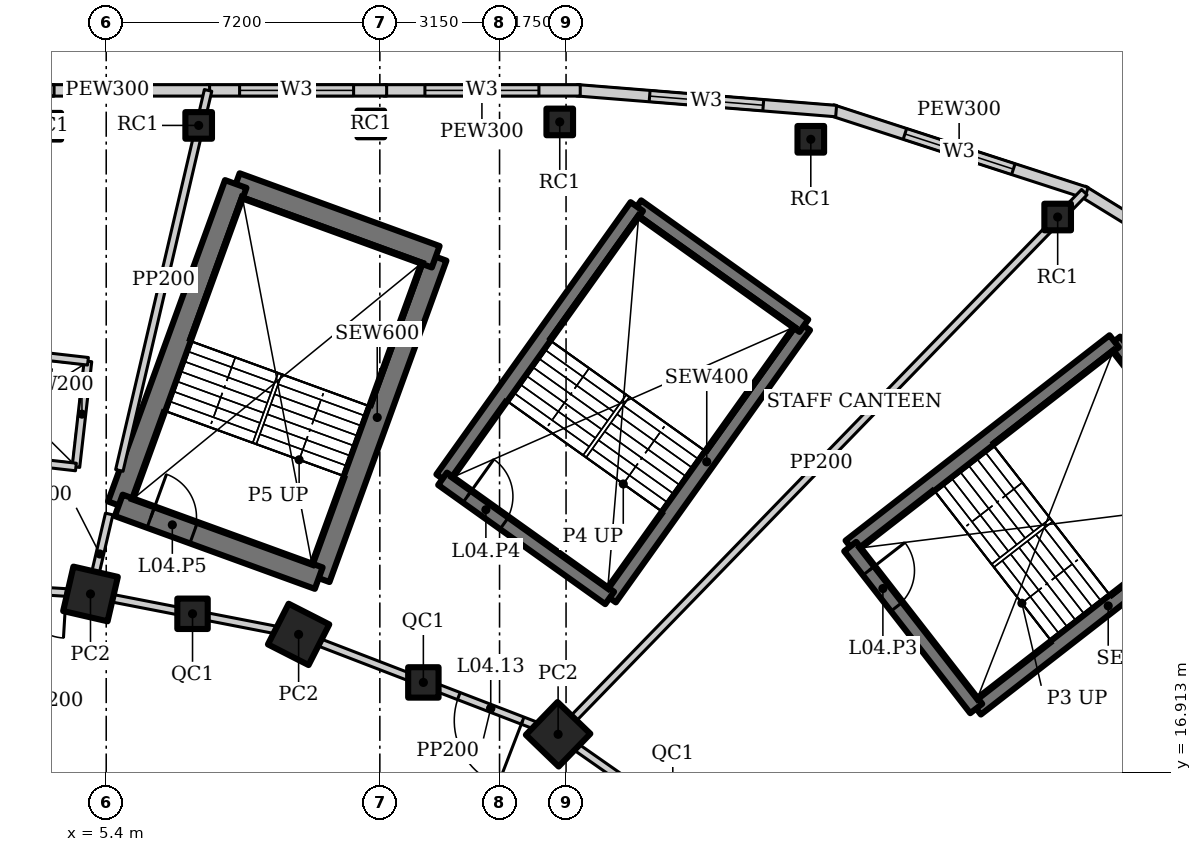
"""IFC4 building model, lengths in metres.
Left out: names, types, materials, properties, quantities, classifications, styles, units other than length and angle.
Written with IfcOpenShell. Run it as: python <this file> out.ifc"""

import sys

from ifc_helpers import new_model, si_unit, direction, frame, frame_2d, origin, origin_2d, place, context, subcontext, project, spatial, rectangle, hollow_rectangle, extrude, element, fill, save


model = new_model("IFC4")
c1 = context("Model", 3, precision=1e-05, world=origin(), true_north=direction((0.0, 1.0)))
c2 = subcontext(c1, "Body", "Model", "MODEL_VIEW")
j1 = project(units=[si_unit("LENGTHUNIT", "METRE"), si_unit("PLANEANGLEUNIT", "RADIAN")], contexts=[c1])
p1 = place(None, origin())
s1 = spatial("IfcSite", under=j1, at=p1, CompositionType="ELEMENT")
p2 = place(p1, origin())
s2 = spatial("IfcBuilding", under=s1, at=p2, CompositionType="ELEMENT")
p3 = place(p2, frame((0.0, 0.0, 27.0)))
s3 = spatial("IfcBuildingStorey", under=s2, at=p3, CompositionType="ELEMENT", Elevation=27.0)
for number, where, z_axis, x_axis in (
    (1, (17.291, 17.905, 0.0), (0.0, 0.0, 1.0), (0.695, 0.719, 0.0)),
    (2, (10.463, 20.534, 0.0), (0.0, 0.0, 1.0), (0.454, 0.891, 0.0)),
    (3, (4.986, 21.598, 0.0), (0.0, 0.0, 1.0), (0.225, 0.974, 0.0)),
):
    element("IfcColumn", number, at=place(p3, frame(where, z_axis=z_axis, x_axis=x_axis)), inside=s3, PredefinedType="COLUMN", context=c2, shape_type="SweptSolid", body=[
        extrude(hollow_rectangle(XDim=1.2, YDim=1.2, WallThickness=0.1, at=origin_2d()), origin(), (0.0, 0.0, 1.0), 5.0),
    ])
for number, where, z_axis, x_axis in (
    (4, (13.745, 19.27, 0.0), (0.0, 0.0, 1.0), (1.0, 0.0, 0.0)),
    (5, (7.671, 21.076, 0.0), (0.0, 0.0, 1.0), (1.0, 0.0, 0.0)),
):
    element("IfcColumn", number, at=place(p3, frame(where, z_axis=z_axis, x_axis=x_axis)), inside=s3, PredefinedType="COLUMN", context=c2, shape_type="SweptSolid", body=[
        extrude(hollow_rectangle(XDim=0.8, YDim=0.8, WallThickness=0.05, at=origin_2d()), origin(), (0.0, 0.0, 1.0), 4.8),
    ])
for number, where, z_axis, x_axis in (
    (6, (23.94, 33.563, 0.0), (0.0, 0.0, 1.0), (1.0, 0.0, 0.0)),
    (7, (12.363, 33.966, 0.0), (0.0, 0.0, 1.0), (1.0, 0.0, 0.0)),
    (8, (3.863, 33.907, 0.0), (0.0, 0.0, 1.0), (1.0, 0.0, 0.0)),
    (9, (30.436, 31.518, 0.0), (0.0, 0.0, 1.0), (1.0, 0.0, 0.0)),
    (10, (17.334, 34.02, 0.0), (0.0, 0.0, 1.0), (1.0, 0.0, 0.0)),
    (11, (7.833, 33.928, 0.0), (0.0, 0.0, 1.0), (1.0, 0.0, 0.0)),
):
    element("IfcColumn", number, at=place(p3, frame(where, z_axis=z_axis, x_axis=x_axis)), inside=s3, PredefinedType="COLUMN", context=c2, shape_type="SweptSolid", body=[
        extrude(hollow_rectangle(XDim=0.7, YDim=0.7, WallThickness=0.04, at=origin_2d()), origin(), (0.0, 0.0, 1.0), 4.8),
    ])
p4 = place(p3, frame((36.932, 28.608, 0.0), z_axis=(0.0, 0.0, 1.0), x_axis=(-0.851808565246, 0.52385319334, 0.0)))
e12 = element("IfcWall", 12, at=p4, inside=s3, PredefinedType="SOLIDWALL", context=c2, shape_type="SweptSolid", body=[
    extrude(rectangle(XDim=6.861, YDim=0.3, at=frame_2d((3.43, 0.0))), origin(), (0.0, 0.0, 1.0), 4.8),
])
p5 = place(p4, frame((1.93, 0.0, 0.9)))
e13 = element("IfcOpeningElement", 13, at=p5, cuts=e12, PredefinedType="OPENING", context=c2, shape_type="SweptSolid", body=[
    extrude(rectangle(XDim=3.0, YDim=2.0, at=frame_2d((1.5, 1.0))), frame((0.0, 0.16, 0.0), z_axis=(0.0, -1.0, 0.0), x_axis=(1.0, 0.0, 0.0)), (0.0, 0.0, 1.0), 0.32),
])
p6 = place(p3, frame((31.192, 32.154, 0.0), z_axis=(0.0, 0.0, 1.0), x_axis=(-0.951140010357, 0.308759907853, 0.0)))
e14 = element("IfcWall", 14, at=p6, inside=s3, PredefinedType="SOLIDWALL", context=c2, shape_type="SweptSolid", body=[
    extrude(rectangle(XDim=7.041, YDim=0.3, at=frame_2d((3.521, 0.0))), origin(), (0.0, 0.0, 1.0), 4.8),
])
p7 = place(p6, frame((2.021, 0.0, 0.9)))
e15 = element("IfcOpeningElement", 15, at=p7, cuts=e14, PredefinedType="OPENING", context=c2, shape_type="SweptSolid", body=[
    extrude(rectangle(XDim=3.0, YDim=2.0, at=frame_2d((1.5, 1.0))), frame((0.0, 0.16, 0.0), z_axis=(0.0, -1.0, 0.0), x_axis=(1.0, 0.0, 0.0)), (0.0, 0.0, 1.0), 0.32),
])
p8 = place(p3, frame((24.607, 34.306, 0.0), z_axis=(0.0, 0.0, 1.0), x_axis=(-0.996791084449, 0.080047073422, 0.0)))
e16 = element("IfcWall", 16, at=p8, inside=s3, PredefinedType="SOLIDWALL", context=c2, shape_type="SweptSolid", body=[
    extrude(rectangle(XDim=6.847, YDim=0.3, at=frame_2d((3.424, 0.0))), origin(), (0.0, 0.0, 1.0), 4.8),
])
p9 = place(p8, frame((1.924, 0.0, 0.9)))
e17 = element("IfcOpeningElement", 17, at=p9, cuts=e16, PredefinedType="OPENING", context=c2, shape_type="SweptSolid", body=[
    extrude(rectangle(XDim=3.0, YDim=2.0, at=frame_2d((1.5, 1.0))), frame((0.0, 0.16, 0.0), z_axis=(0.0, -1.0, 0.0), x_axis=(1.0, 0.0, 0.0)), (0.0, 0.0, 1.0), 0.32),
])
p10 = place(p3, frame((17.873, 34.85, 0.0), z_axis=(0.0, 0.0, 1.0), x_axis=(-1.0, 0.0, 0.0)))
e18 = element("IfcWall", 18, at=p10, inside=s3, PredefinedType="SOLIDWALL", context=c2, shape_type="SweptSolid", body=[
    extrude(rectangle(XDim=5.174, YDim=0.3, at=frame_2d((2.587, 0.0))), origin(), (0.0, 0.0, 1.0), 4.8),
])
p11 = place(p10, frame((1.087, 0.0, 0.9)))
e19 = element("IfcOpeningElement", 19, at=p11, cuts=e18, PredefinedType="OPENING", context=c2, shape_type="SweptSolid", body=[
    extrude(rectangle(XDim=3.0, YDim=2.0, at=frame_2d((1.5, 1.0))), frame((0.0, 0.16, 0.0), z_axis=(0.0, -1.0, 0.0), x_axis=(1.0, 0.0, 0.0)), (0.0, 0.0, 1.0), 0.32),
])
p12 = place(p3, frame((12.779, 34.85, 0.0), z_axis=(0.0, 0.0, 1.0), x_axis=(-1.0, 0.0, 0.0)))
e20 = element("IfcWall", 20, at=p12, inside=s3, PredefinedType="SOLIDWALL", context=c2, shape_type="SweptSolid", body=[
    extrude(rectangle(XDim=4.739, YDim=0.3, at=frame_2d((2.369, 0.0))), origin(), (0.0, 0.0, 1.0), 4.8),
])
p13 = place(p12, frame((0.869, 0.0, 0.9)))
e21 = element("IfcOpeningElement", 21, at=p13, cuts=e20, PredefinedType="OPENING", context=c2, shape_type="SweptSolid", body=[
    extrude(rectangle(XDim=3.0, YDim=2.0, at=frame_2d((1.5, 1.0))), frame((0.0, 0.16, 0.0), z_axis=(0.0, -1.0, 0.0), x_axis=(1.0, 0.0, 0.0)), (0.0, 0.0, 1.0), 0.32),
])
p14 = place(p3, frame((8.12, 34.85, 0.0), z_axis=(0.0, 0.0, 1.0), x_axis=(-1.0, 0.0, 0.0)))
e22 = element("IfcWall", 22, at=p14, inside=s3, PredefinedType="SOLIDWALL", context=c2, shape_type="SweptSolid", body=[
    extrude(rectangle(XDim=4.173, YDim=0.3, at=frame_2d((2.086, 0.0))), origin(), (0.0, 0.0, 1.0), 4.8),
])
p15 = place(p3, frame((4.028, 34.85, 0.0), z_axis=(0.0, 0.0, 1.0), x_axis=(-1.0, 0.0, 0.0)))
e23 = element("IfcWall", 23, at=p15, inside=s3, PredefinedType="SOLIDWALL", context=c2, shape_type="SweptSolid", body=[
    extrude(rectangle(XDim=4.068, YDim=0.3, at=frame_2d((2.034, 0.0))), origin(), (0.0, 0.0, 1.0), 4.8),
])
p16 = place(p3, frame((20.309, 15.794, 0.0), z_axis=(0.0, 0.0, 1.0), x_axis=(-0.819409395821, 0.573208724672, 0.0)))
e24 = element("IfcWall", 24, at=p16, inside=s3, PredefinedType="SOLIDWALL", context=c2, shape_type="SweptSolid", body=[
    extrude(rectangle(XDim=3.683, YDim=0.2, at=frame_2d((1.841, 0.0))), origin(), (0.0, 0.0, 1.0), 4.338),
])
p17 = place(p3, frame((17.291, 17.905, 0.0), z_axis=(0.0, 0.0, 1.0), x_axis=(-0.933224646415, 0.359293416754, 0.0)))
e25 = element("IfcWall", 25, at=p17, inside=s3, PredefinedType="SOLIDWALL", context=c2, shape_type="SweptSolid", body=[
    extrude(rectangle(XDim=3.799, YDim=0.2, at=frame_2d((1.899, 0.0))), origin(), (0.0, 0.0, 1.0), 4.302),
])
p18 = place(p17, frame((1.0, 0.0, 0.0)))
e26 = element("IfcOpeningElement", 26, at=p18, cuts=e25, PredefinedType="OPENING", context=c2, shape_type="SweptSolid", body=[
    extrude(rectangle(XDim=1.8, YDim=2.4, at=frame_2d((0.9, 1.2))), frame((0.0, 0.11, 0.0), z_axis=(0.0, -1.0, 0.0), x_axis=(1.0, 0.0, 0.0)), (0.0, 0.0, 1.0), 0.22),
])
p19 = place(p3, frame((13.745, 19.27, 0.0), z_axis=(0.0, 0.0, 1.0), x_axis=(-0.933241815012, 0.359248820058, 0.0)))
e27 = element("IfcWall", 27, at=p19, inside=s3, PredefinedType="SOLIDWALL", context=c2, shape_type="SweptSolid", body=[
    extrude(rectangle(XDim=3.518, YDim=0.2, at=frame_2d((1.759, 0.0))), origin(), (0.0, 0.0, 1.0), 4.099),
])
p20 = place(p3, frame((10.463, 20.534, 0.0), z_axis=(0.0, 0.0, 1.0), x_axis=(-0.98163593748, 0.190763954266, 0.0)))
e28 = element("IfcWall", 28, at=p20, inside=s3, PredefinedType="SOLIDWALL", context=c2, shape_type="SweptSolid", body=[
    extrude(rectangle(XDim=2.844, YDim=0.2, at=frame_2d((1.422, 0.0))), origin(), (0.0, 0.0, 1.0), 4.338),
])
p21 = place(p3, frame((7.671, 21.076, 0.0), z_axis=(0.0, 0.0, 1.0), x_axis=(-0.981637218105, 0.190757364289, 0.0)))
e29 = element("IfcWall", 29, at=p21, inside=s3, PredefinedType="SOLIDWALL", context=c2, shape_type="SweptSolid", body=[
    extrude(rectangle(XDim=2.735, YDim=0.2, at=frame_2d((1.368, 0.0))), origin(), (0.0, 0.0, 1.0), 4.338),
])
p22 = place(p3, frame((4.986, 21.598, 0.0), z_axis=(0.0, 0.0, 1.0), x_axis=(-0.998172405641, 0.060430527186, 0.0)))
e30 = element("IfcWall", 30, at=p22, inside=s3, PredefinedType="SOLIDWALL", context=c2, shape_type="SweptSolid", body=[
    extrude(rectangle(XDim=2.513, YDim=0.2, at=frame_2d((1.256, 0.0))), origin(), (0.0, 0.0, 1.0), 4.338),
])
p23 = place(p22, frame((0.64, 0.0, 0.0)))
e31 = element("IfcOpeningElement", 31, at=p23, cuts=e30, PredefinedType="OPENING", context=c2, shape_type="SweptSolid", body=[
    extrude(rectangle(XDim=1.2, YDim=2.4, at=frame_2d((0.6, 1.2))), frame((0.0, 0.11, 0.0), z_axis=(0.0, -1.0, 0.0), x_axis=(1.0, 0.0, 0.0)), (0.0, 0.0, 1.0), 0.22),
])
p24 = place(p3, frame((17.291, 17.905, 0.0), z_axis=(0.0, 0.0, 1.0), x_axis=(0.696460684513, 0.717594951855, 0.0)))
e32 = element("IfcWall", 32, at=p24, inside=s3, PredefinedType="SOLIDWALL", context=c2, shape_type="SweptSolid", body=[
    extrude(rectangle(XDim=19.881, YDim=0.2, at=frame_2d((9.94, 0.0))), origin(), (0.0, 0.0, 1.0), 3.3),
])
p25 = place(p3, frame((4.986, 21.598, 0.0), z_axis=(0.0, 0.0, 1.0), x_axis=(0.227351065365, 0.973812863479, 0.0)))
e33 = element("IfcWall", 33, at=p25, inside=s3, PredefinedType="SOLIDWALL", context=c2, shape_type="SweptSolid", body=[
    extrude(rectangle(XDim=2.161, YDim=0.2, at=frame_2d((1.08, 0.0))), origin(), (0.0, 0.0, 1.0), 2.8),
])
p26 = place(p3, frame((5.745, 24.849, 0.0), z_axis=(0.0, 0.0, 1.0), x_axis=(0.227353607936, 0.973812269875, 0.0)))
e34 = element("IfcWall", 34, at=p26, inside=s3, PredefinedType="SOLIDWALL", context=c2, shape_type="SweptSolid", body=[
    extrude(rectangle(XDim=10.27, YDim=0.2, at=frame_2d((5.135, 0.0))), origin(), (0.0, 0.0, 1.0), 2.8),
])
p27 = place(p3, frame((28.293, 18.583, 0.0), z_axis=(0.0, 0.0, 1.0), x_axis=(0.78938060008, 0.613904119726, 0.0)))
e35 = element("IfcWall", 35, at=p27, inside=s3, PredefinedType="SHEAR", context=c2, shape_type="SweptSolid", body=[
    extrude(rectangle(XDim=8.8, YDim=0.4, at=frame_2d((4.4, 0.0))), origin(), (0.0, 0.0, 1.0), 5.0),
])
p28 = place(p3, frame((35.239, 23.985, 0.0), z_axis=(0.0, 0.0, 1.0), x_axis=(-0.613912443548, 0.789374126544, 0.0)))
e36 = element("IfcWall", 36, at=p28, inside=s3, PredefinedType="SHEAR", context=c2, shape_type="SweptSolid", body=[
    extrude(rectangle(XDim=5.4, YDim=0.4, at=frame_2d((2.7, 0.0))), origin(), (0.0, 0.0, 1.0), 5.0),
])
p29 = place(p3, frame((31.924, 28.248, 0.0), z_axis=(0.0, 0.0, 1.0), x_axis=(-0.78938060008, -0.613904119726, 0.0)))
e37 = element("IfcWall", 37, at=p29, inside=s3, PredefinedType="SHEAR", context=c2, shape_type="SweptSolid", body=[
    extrude(rectangle(XDim=8.8, YDim=0.4, at=frame_2d((4.4, 0.0))), origin(), (0.0, 0.0, 1.0), 5.0),
])
p30 = place(p3, frame((24.978, 22.846, 0.0), z_axis=(0.0, 0.0, 1.0), x_axis=(0.613912443548, -0.789374126544, 0.0)))
e38 = element("IfcWall", 38, at=p30, inside=s3, PredefinedType="SHEAR", context=c2, shape_type="SweptSolid", body=[
    extrude(rectangle(XDim=5.4, YDim=0.4, at=frame_2d((2.7, 0.0))), origin(), (0.0, 0.0, 1.0), 5.0),
])
p31 = place(p30, frame((0.8, 0.0, 0.0)))
e39 = element("IfcOpeningElement", 39, at=p31, cuts=e38, PredefinedType="OPENING", context=c2, shape_type="SweptSolid", body=[
    extrude(rectangle(XDim=1.2, YDim=2.1, at=frame_2d((0.6, 1.05))), frame((0.0, 0.21, 0.0), z_axis=(0.0, -1.0, 0.0), x_axis=(1.0, 0.0, 0.0)), (0.0, 0.0, 1.0), 0.42),
])
p32 = place(p3, frame((18.647, 21.493, 0.0), z_axis=(0.0, 0.0, 1.0), x_axis=(0.580705313356, 0.814113836659, 0.0)))
e40 = element("IfcWall", 40, at=p32, inside=s3, PredefinedType="SHEAR", context=c2, shape_type="SweptSolid", body=[
    extrude(rectangle(XDim=8.8, YDim=0.4, at=frame_2d((4.4, 0.0))), origin(), (0.0, 0.0, 1.0), 5.0),
])
p33 = place(p3, frame((23.757, 28.657, 0.0), z_axis=(0.0, 0.0, 1.0), x_axis=(-0.814121252423, 0.580694916762, 0.0)))
e41 = element("IfcWall", 41, at=p33, inside=s3, PredefinedType="SHEAR", context=c2, shape_type="SweptSolid", body=[
    extrude(rectangle(XDim=5.4, YDim=0.4, at=frame_2d((2.7, 0.0))), origin(), (0.0, 0.0, 1.0), 5.0),
])
p34 = place(p3, frame((19.361, 31.793, 0.0), z_axis=(0.0, 0.0, 1.0), x_axis=(-0.580705313356, -0.814113836659, 0.0)))
e42 = element("IfcWall", 42, at=p34, inside=s3, PredefinedType="SHEAR", context=c2, shape_type="SweptSolid", body=[
    extrude(rectangle(XDim=8.8, YDim=0.4, at=frame_2d((4.4, 0.0))), origin(), (0.0, 0.0, 1.0), 5.0),
])
p35 = place(p3, frame((14.251, 24.629, 0.0), z_axis=(0.0, 0.0, 1.0), x_axis=(0.814121252423, -0.580694916762, 0.0)))
e43 = element("IfcWall", 43, at=p35, inside=s3, PredefinedType="SHEAR", context=c2, shape_type="SweptSolid", body=[
    extrude(rectangle(XDim=5.4, YDim=0.4, at=frame_2d((2.7, 0.0))), origin(), (0.0, 0.0, 1.0), 5.0),
])
p36 = place(p35, frame((0.8, 0.0, 0.0)))
e44 = element("IfcOpeningElement", 44, at=p36, cuts=e43, PredefinedType="OPENING", context=c2, shape_type="SweptSolid", body=[
    extrude(rectangle(XDim=1.2, YDim=2.1, at=frame_2d((0.6, 1.05))), frame((0.0, 0.21, 0.0), z_axis=(0.0, -1.0, 0.0), x_axis=(1.0, 0.0, 0.0)), (0.0, 0.0, 1.0), 0.42),
])
p37 = place(p3, frame((10.992, 22.014, 0.0), z_axis=(0.0, 0.0, 1.0), x_axis=(0.342013127703, 0.939695174234, 0.0)))
e45 = element("IfcWall", 45, at=p37, inside=s3, PredefinedType="SHEAR", context=c2, shape_type="SweptSolid", body=[
    extrude(rectangle(XDim=9.0, YDim=0.6, at=frame_2d((4.5, 0.0))), origin(), (0.0, 0.0, 1.0), 5.0),
])
p38 = place(p3, frame((14.07, 30.471, 0.0), z_axis=(0.0, 0.0, 1.0), x_axis=(-0.939692822968, 0.342019587834, 0.0)))
e46 = element("IfcWall", 46, at=p38, inside=s3, PredefinedType="SHEAR", context=c2, shape_type="SweptSolid", body=[
    extrude(rectangle(XDim=5.6, YDim=0.6, at=frame_2d((2.8, 0.0))), origin(), (0.0, 0.0, 1.0), 5.0),
])
p39 = place(p3, frame((8.808, 32.387, 0.0), z_axis=(0.0, 0.0, 1.0), x_axis=(-0.3420218461, -0.939692001025, 0.0)))
e47 = element("IfcWall", 47, at=p39, inside=s3, PredefinedType="SHEAR", context=c2, shape_type="SweptSolid", body=[
    extrude(rectangle(XDim=9.0, YDim=0.6, at=frame_2d((4.5, 0.0))), origin(), (0.0, 0.0, 1.0), 5.0),
])
p40 = place(p3, frame((5.73, 23.93, 0.0), z_axis=(0.0, 0.0, 1.0), x_axis=(0.939678810556, -0.342058084236, 0.0)))
e48 = element("IfcWall", 48, at=p40, inside=s3, PredefinedType="SHEAR", context=c2, shape_type="SweptSolid", body=[
    extrude(rectangle(XDim=5.6, YDim=0.6, at=frame_2d((2.8, 0.0))), origin(), (0.0, 0.0, 1.0), 5.0),
])
p41 = place(p40, frame((0.9, 0.0, 0.0)))
e49 = element("IfcOpeningElement", 49, at=p41, cuts=e48, PredefinedType="OPENING", context=c2, shape_type="SweptSolid", body=[
    extrude(rectangle(XDim=1.2, YDim=2.1, at=frame_2d((0.6, 1.05))), frame((0.0, 0.31, 0.0), z_axis=(0.0, -1.0, 0.0), x_axis=(1.0, 0.0, 0.0)), (0.0, 0.0, 1.0), 0.62),
])
p42 = place(p3, frame((4.603, 24.939, 0.0), z_axis=(0.0, 0.0, 1.0), x_axis=(0.113177712989, 0.993574760792, 0.0)))
e50 = element("IfcWall", 50, at=p42, inside=s3, PredefinedType="SOLIDWALL", context=c2, shape_type="SweptSolid", body=[
    extrude(rectangle(XDim=2.8, YDim=0.2, at=frame_2d((1.4, 0.0))), origin(), (0.0, 0.0, 1.0), 4.8),
])
p43 = place(p3, frame((4.92, 27.721, 0.0), z_axis=(0.0, 0.0, 1.0), x_axis=(-0.993571061716, 0.113210182053, 0.0)))
e51 = element("IfcWall", 51, at=p43, inside=s3, PredefinedType="SOLIDWALL", context=c2, shape_type="SweptSolid", body=[
    extrude(rectangle(XDim=3.5, YDim=0.2, at=frame_2d((1.75, 0.0))), origin(), (0.0, 0.0, 1.0), 4.8),
])
p44 = place(p3, frame((1.125, 25.335, 0.0), z_axis=(0.0, 0.0, 1.0), x_axis=(0.993571061716, -0.113210182053, 0.0)))
e52 = element("IfcWall", 52, at=p44, inside=s3, PredefinedType="SOLIDWALL", context=c2, shape_type="SweptSolid", body=[
    extrude(rectangle(XDim=3.5, YDim=0.2, at=frame_2d((1.75, 0.0))), origin(), (0.0, 0.0, 1.0), 4.8),
])
p45 = place(p44, frame((1.2, 0.0, 0.0)))
e53 = element("IfcOpeningElement", 53, at=p45, cuts=e52, PredefinedType="OPENING", context=c2, shape_type="SweptSolid", body=[
    extrude(rectangle(XDim=1.1, YDim=2.2, at=frame_2d((0.55, 1.1))), frame((0.0, 0.11, 0.0), z_axis=(0.0, -1.0, 0.0), x_axis=(1.0, 0.0, 0.0)), (0.0, 0.0, 1.0), 0.22),
])
p46 = place(p7, origin())
e54 = element("IfcWindow", 54, at=p46, inside=s3, PartitioningType="SINGLE_PANEL", PredefinedType="WINDOW", context=c2, shape_type="SweptSolid", body=[
    extrude(rectangle(XDim=3.0, YDim=2.0, at=frame_2d((1.5, 1.0))), frame((0.0, 0.03, 0.0), z_axis=(0.0, -1.0, 0.0), x_axis=(1.0, 0.0, 0.0)), (0.0, 0.0, 1.0), 0.06),
])
fill(e15, e54)
p47 = place(p9, origin())
e55 = element("IfcWindow", 55, at=p47, inside=s3, PartitioningType="SINGLE_PANEL", PredefinedType="WINDOW", context=c2, shape_type="SweptSolid", body=[
    extrude(rectangle(XDim=3.0, YDim=2.0, at=frame_2d((1.5, 1.0))), frame((0.0, 0.03, 0.0), z_axis=(0.0, -1.0, 0.0), x_axis=(1.0, 0.0, 0.0)), (0.0, 0.0, 1.0), 0.06),
])
fill(e17, e55)
p48 = place(p11, origin())
e56 = element("IfcWindow", 56, at=p48, inside=s3, PartitioningType="SINGLE_PANEL", PredefinedType="WINDOW", context=c2, shape_type="SweptSolid", body=[
    extrude(rectangle(XDim=3.0, YDim=2.0, at=frame_2d((1.5, 1.0))), frame((0.0, 0.03, 0.0), z_axis=(0.0, -1.0, 0.0), x_axis=(1.0, 0.0, 0.0)), (0.0, 0.0, 1.0), 0.06),
])
fill(e19, e56)
p49 = place(p13, origin())
e57 = element("IfcWindow", 57, at=p49, inside=s3, PartitioningType="SINGLE_PANEL", PredefinedType="WINDOW", context=c2, shape_type="SweptSolid", body=[
    extrude(rectangle(XDim=3.0, YDim=2.0, at=frame_2d((1.5, 1.0))), frame((0.0, 0.03, 0.0), z_axis=(0.0, -1.0, 0.0), x_axis=(1.0, 0.0, 0.0)), (0.0, 0.0, 1.0), 0.06),
])
fill(e21, e57)
p50 = place(p18, origin())
e58 = element("IfcDoor", 58, at=p50, inside=s3, OperationType="DOUBLE_DOOR_DOUBLE_SWING", PredefinedType="DOOR", context=c2, shape_type="SweptSolid", body=[
    extrude(rectangle(XDim=1.8, YDim=2.4, at=frame_2d((0.9, 1.2))), frame((0.0, 0.025, 0.0), z_axis=(0.0, -1.0, 0.0), x_axis=(1.0, 0.0, 0.0)), (0.0, 0.0, 1.0), 0.05),
])
fill(e26, e58)
p51 = place(p23, origin())
e59 = element("IfcDoor", 59, at=p51, inside=s3, OperationType="SINGLE_SWING_RIGHT", PredefinedType="DOOR", context=c2, shape_type="SweptSolid", body=[
    extrude(rectangle(XDim=1.2, YDim=2.4, at=frame_2d((0.6, 1.2))), frame((0.0, 0.025, 0.0), z_axis=(0.0, -1.0, 0.0), x_axis=(1.0, 0.0, 0.0)), (0.0, 0.0, 1.0), 0.05),
])
fill(e31, e59)
p52 = place(p31, origin())
e60 = element("IfcDoor", 60, at=p52, inside=s3, OperationType="SINGLE_SWING_RIGHT", PredefinedType="DOOR", context=c2, shape_type="SweptSolid", body=[
    extrude(rectangle(XDim=1.2, YDim=2.1, at=frame_2d((0.6, 1.05))), frame((0.0, 0.025, 0.0), z_axis=(0.0, -1.0, 0.0), x_axis=(1.0, 0.0, 0.0)), (0.0, 0.0, 1.0), 0.05),
])
fill(e39, e60)
p53 = place(p36, origin())
e61 = element("IfcDoor", 61, at=p53, inside=s3, OperationType="SINGLE_SWING_RIGHT", PredefinedType="DOOR", context=c2, shape_type="SweptSolid", body=[
    extrude(rectangle(XDim=1.2, YDim=2.1, at=frame_2d((0.6, 1.05))), frame((0.0, 0.025, 0.0), z_axis=(0.0, -1.0, 0.0), x_axis=(1.0, 0.0, 0.0)), (0.0, 0.0, 1.0), 0.05),
])
fill(e44, e61)
p54 = place(p41, origin())
e62 = element("IfcDoor", 62, at=p54, inside=s3, OperationType="SINGLE_SWING_RIGHT", PredefinedType="DOOR", context=c2, shape_type="SweptSolid", body=[
    extrude(rectangle(XDim=1.2, YDim=2.1, at=frame_2d((0.6, 1.05))), frame((0.0, 0.025, 0.0), z_axis=(0.0, -1.0, 0.0), x_axis=(1.0, 0.0, 0.0)), (0.0, 0.0, 1.0), 0.05),
])
fill(e49, e62)
save(model, sys.argv[1])
